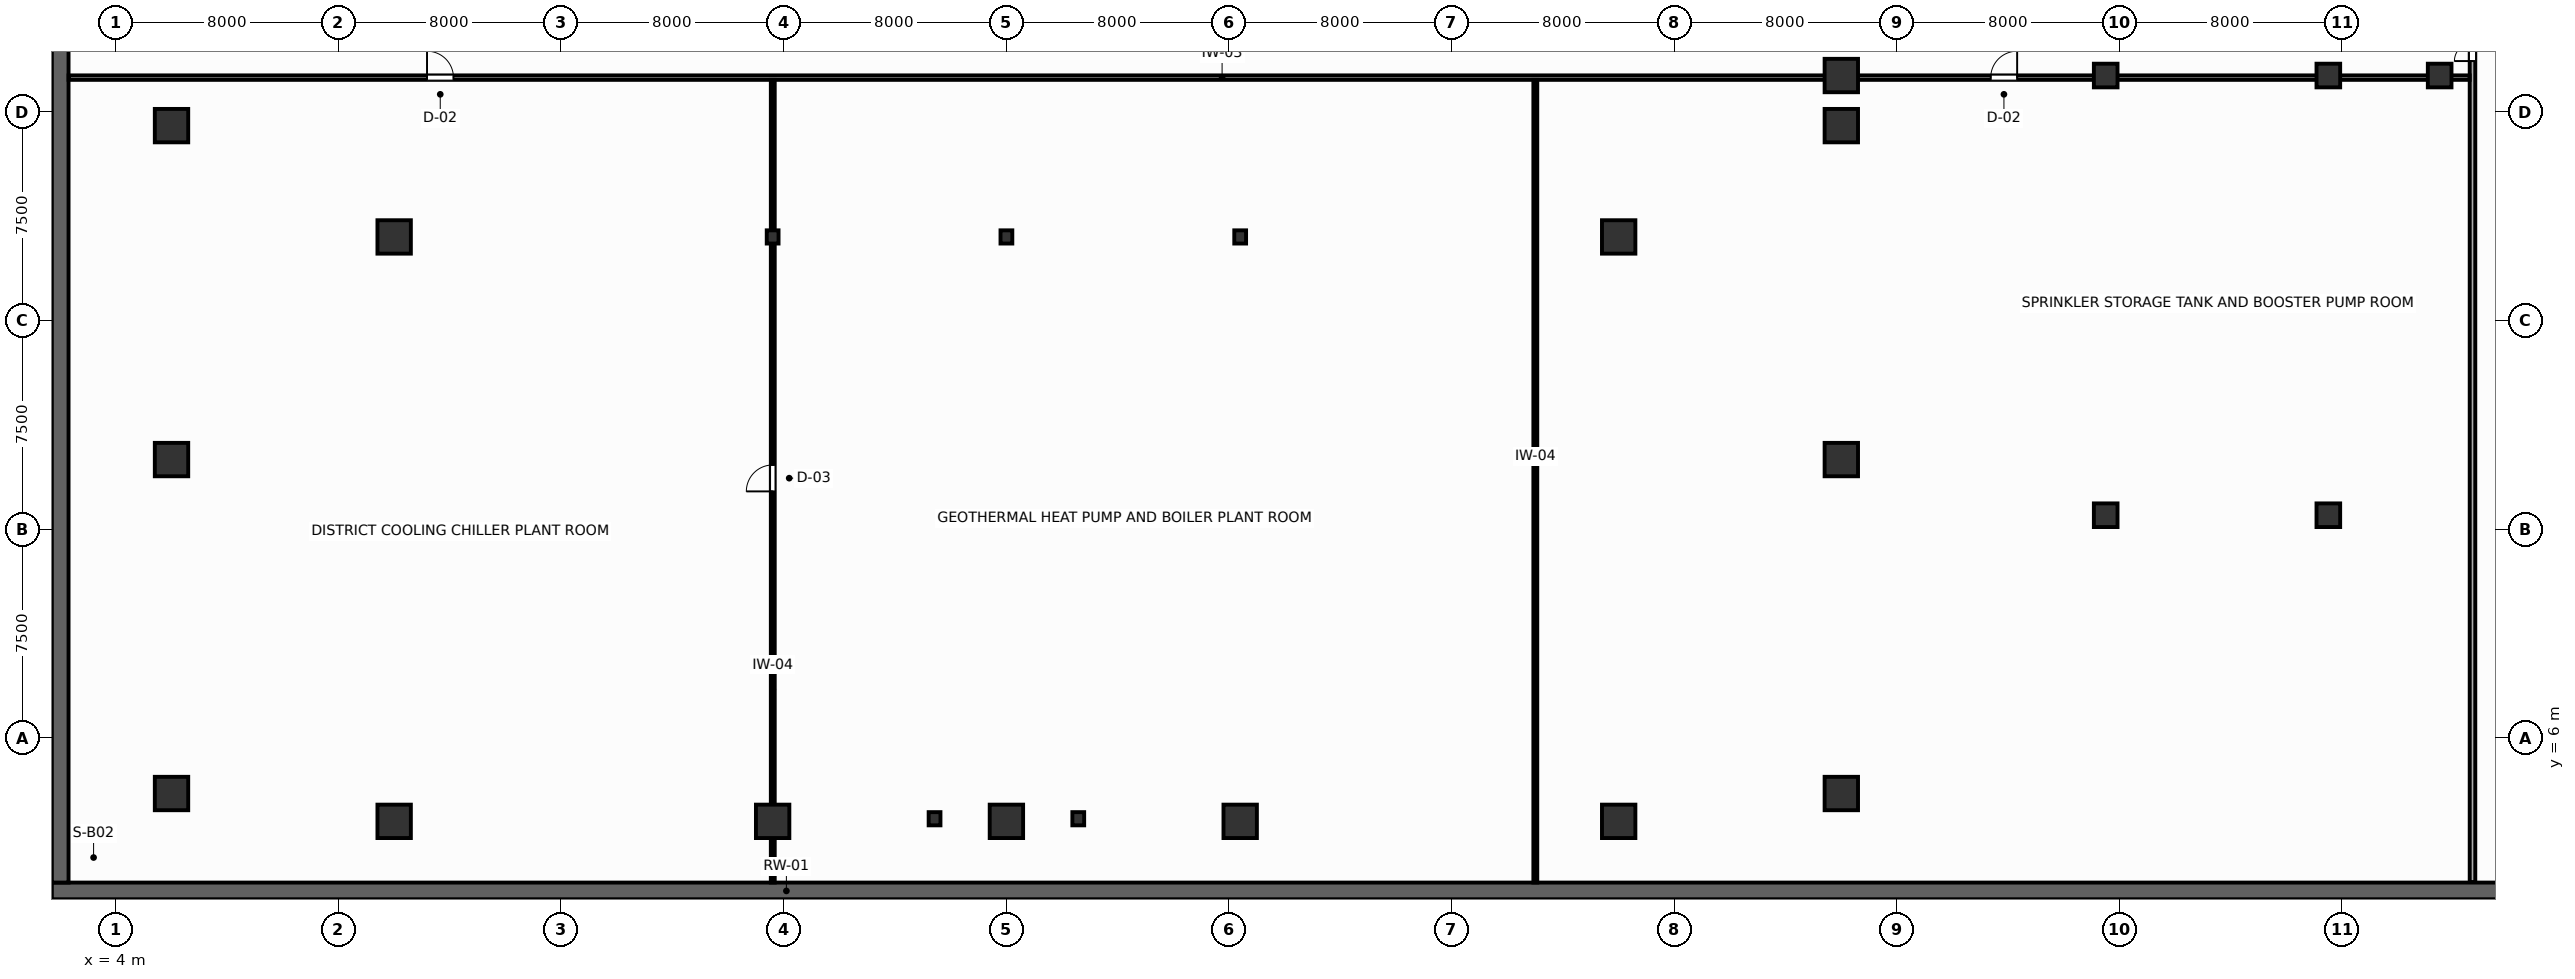
"""IFC4 building model, lengths in metres.
Left out: names, types, materials, properties, quantities, classifications, styles, units other than length and angle.
Written with IfcOpenShell. Run it as: python <this file> out.ifc"""

import sys

from ifc_helpers import new_model, si_unit, direction, frame, frame_2d, origin, origin_2d, place, context, subcontext, project, spatial, rectangle, i_section, extrude, source, transform, mapped, element, fill, save


model = new_model("IFC4")
c1 = context("Model", 3, precision=1e-05, world=origin(), true_north=direction((0.0, 1.0)))
c2 = subcontext(c1, "Body", "Model", "MODEL_VIEW")
j1 = project(units=[si_unit("LENGTHUNIT", "METRE"), si_unit("PLANEANGLEUNIT", "RADIAN")], contexts=[c1])
p1 = place(None, origin())
s1 = spatial("IfcSite", under=j1, at=p1, CompositionType="ELEMENT")
p2 = place(p1, origin())
s2 = spatial("IfcBuilding", under=s1, at=p2, CompositionType="ELEMENT")
p3 = place(p2, frame((0.0, 0.0, -9.0)))
s3 = spatial("IfcBuildingStorey", under=s2, at=p3, CompositionType="ELEMENT", Elevation=-9.0)
p4 = place(p3, frame((1.7, 0.5, 0.0), z_axis=(0.0, 0.0, 1.0), x_axis=(1.0, 0.0, 0.0)))
e1 = element("IfcWall", 1, at=p4, inside=s3, PredefinedType="SOLIDWALL", context=c2, shape_type="SweptSolid", body=[
    extrude(rectangle(XDim=87.98, YDim=0.6, at=frame_2d((43.99, 0.0))), origin(), (0.0, 0.0, 1.0), 4.5),
])
p5 = place(p3, frame((2.0, 0.8, 0.0), z_axis=(0.0, 0.0, 1.0), x_axis=(0.0, 1.0, 0.0)))
e2 = element("IfcWall", 2, at=p5, inside=s3, PredefinedType="SOLIDWALL", context=c2, shape_type="SweptSolid", body=[
    extrude(rectangle(XDim=64.9, YDim=0.6, at=frame_2d((32.45, 0.0))), origin(), (0.0, 0.0, 1.0), 4.5),
])
m1 = source(origin(), c2, "Body", "SweptSolid", [
    extrude(i_section(OverallWidth=0.424, OverallDepth=0.474, WebThickness=0.045, FlangeThickness=0.072, FilletRadius=0.015, at=origin_2d()), origin(), (0.0, 0.0, 1.0), 4.5),
])
for number, where, z_axis, x_axis in (
    (3, (27.6, 24.0, 0.0), (0.0, 0.0, 1.0), (1.0, 0.0, 0.0)),
    (4, (44.4, 24.0, 0.0), (0.0, 0.0, 1.0), (1.0, 0.0, 0.0)),
    (5, (36.0, 24.0, 0.0), (0.0, 0.0, 1.0), (1.0, 0.0, 0.0)),
):
    element("IfcColumn", number, at=place(p3, frame(where, z_axis=z_axis, x_axis=x_axis)), inside=s3, PredefinedType="COLUMN", context=c2, shape_type="MappedRepresentation", body=[
        mapped(m1, transform((0.0, 0.0, 0.0), scale=1.0)),
    ])
m2 = source(origin(), c2, "Body", "SweptSolid", [
    extrude(rectangle(XDim=1.2, YDim=1.2, at=origin_2d()), origin(), (0.0, 0.0, 1.0), 4.5),
])
for number, where, z_axis, x_axis in (
    (6, (6.0, 4.0, 0.0), (0.0, 0.0, 1.0), (1.0, 0.0, 0.0)),
    (7, (6.0, 16.0, 0.0), (0.0, 0.0, 1.0), (1.0, 0.0, 0.0)),
    (8, (6.0, 28.0, 0.0), (0.0, 0.0, 1.0), (1.0, 0.0, 0.0)),
    (9, (66.0, 4.0, 0.0), (0.0, 0.0, 1.0), (1.0, 0.0, 0.0)),
    (10, (66.0, 16.0, 0.0), (0.0, 0.0, 1.0), (1.0, 0.0, 0.0)),
    (11, (66.0, 28.0, 0.0), (0.0, 0.0, 1.0), (1.0, 0.0, 0.0)),
    (12, (14.0, 3.0, 0.0), (0.0, 0.0, 1.0), (1.0, 0.0, 0.0)),
    (13, (27.6, 3.0, 0.0), (0.0, 0.0, 1.0), (1.0, 0.0, 0.0)),
    (14, (36.0, 3.0, 0.0), (0.0, 0.0, 1.0), (1.0, 0.0, 0.0)),
    (15, (44.4, 3.0, 0.0), (0.0, 0.0, 1.0), (1.0, 0.0, 0.0)),
    (16, (58.0, 3.0, 0.0), (0.0, 0.0, 1.0), (1.0, 0.0, 0.0)),
    (17, (14.0, 24.0, 0.0), (0.0, 0.0, 1.0), (1.0, 0.0, 0.0)),
    (18, (58.0, 24.0, 0.0), (0.0, 0.0, 1.0), (1.0, 0.0, 0.0)),
    (19, (66.0, 29.8, 0.0), (0.0, 0.0, 1.0), (1.0, 0.0, 0.0)),
):
    element("IfcColumn", number, at=place(p3, frame(where, z_axis=z_axis, x_axis=x_axis)), inside=s3, PredefinedType="COLUMN", context=c2, shape_type="MappedRepresentation", body=[
        mapped(m2, transform((0.0, 0.0, 0.0), scale=1.0)),
    ])
for number, where, z_axis, x_axis in (
    (20, (33.418, 3.094, 0.0), (0.0, 0.0, 1.0), (1.0, 0.0, 0.0)),
    (21, (38.582, 3.094, 0.0), (0.0, 0.0, 1.0), (1.0, 0.0, 0.0)),
):
    element("IfcColumn", number, at=place(p3, frame(where, z_axis=z_axis, x_axis=x_axis)), inside=s3, PredefinedType="COLUMN", context=c2, shape_type="MappedRepresentation", body=[
        mapped(m1, transform((0.0, 0.0, 0.0), scale=1.0)),
    ])
m3 = source(origin(), c2, "Body", "SweptSolid", [
    extrude(rectangle(XDim=0.85, YDim=0.85, at=origin_2d()), origin(), (0.0, 0.0, 1.0), 4.5),
])
for number, where, z_axis, x_axis in (
    (22, (75.5, 29.8, 0.0), (0.0, 0.0, 1.0), (1.0, 0.0, 0.0)),
    (23, (83.5, 29.8, 0.0), (0.0, 0.0, 1.0), (1.0, 0.0, 0.0)),
    (24, (87.5, 29.8, 0.0), (0.0, 0.0, 1.0), (1.0, 0.0, 0.0)),
    (25, (75.5, 14.0, 0.0), (0.0, 0.0, 1.0), (1.0, 0.0, 0.0)),
    (26, (83.5, 14.0, 0.0), (0.0, 0.0, 1.0), (1.0, 0.0, 0.0)),
):
    element("IfcColumn", number, at=place(p3, frame(where, z_axis=z_axis, x_axis=x_axis)), inside=s3, PredefinedType="COLUMN", context=c2, shape_type="MappedRepresentation", body=[
        mapped(m3, transform((0.0, 0.0, 0.0), scale=1.0)),
    ])
p6 = place(p3, frame((88.68, 0.82, 0.0), z_axis=(0.0, 0.0, 1.0), x_axis=(0.0, 1.0, 0.0)))
e27 = element("IfcWall", 27, at=p6, inside=s3, PredefinedType="PARTITIONING", context=c2, shape_type="SweptSolid", body=[
    extrude(rectangle(XDim=64.86, YDim=0.2, at=frame_2d((32.43, 0.0))), origin(), (0.0, 0.0, 1.0), 4.18),
])
p7 = place(p6, frame((29.5, 0.0, 0.0)))
e28 = element("IfcOpeningElement", 28, at=p7, cuts=e27, PredefinedType="OPENING", context=c2, shape_type="SweptSolid", body=[
    extrude(rectangle(XDim=1.3, YDim=2.1, at=frame_2d((0.65, 1.05))), frame((0.0, 0.11, 0.0), z_axis=(0.0, -1.0, 0.0), x_axis=(1.0, 0.0, 0.0)), (0.0, 0.0, 1.0), 0.22),
])
p8 = place(p3, frame((2.302, 29.725, 0.0), z_axis=(0.0, 0.0, 1.0), x_axis=(1.0, 0.0, 0.0)))
e29 = element("IfcWall", 29, at=p8, inside=s3, PredefinedType="PARTITIONING", context=c2, shape_type="SweptSolid", body=[
    extrude(rectangle(XDim=86.276, YDim=0.16, at=frame_2d((43.138, 0.0))), origin(), (0.0, 0.0, 1.0), 3.69),
])
p9 = place(p8, frame((12.879, 0.0, 0.0)))
e30 = element("IfcOpeningElement", 30, at=p9, cuts=e29, PredefinedType="OPENING", context=c2, shape_type="SweptSolid", body=[
    extrude(rectangle(XDim=0.95, YDim=2.05, at=frame_2d((0.475, 1.025))), frame((0.0, 0.09, 0.0), z_axis=(0.0, -1.0, 0.0), x_axis=(1.0, 0.0, 0.0)), (0.0, 0.0, 1.0), 0.18),
])
p10 = place(p8, frame((69.066, 0.0, 0.0)))
e31 = element("IfcOpeningElement", 31, at=p10, cuts=e29, PredefinedType="OPENING", context=c2, shape_type="SweptSolid", body=[
    extrude(rectangle(XDim=0.95, YDim=2.05, at=frame_2d((0.475, 1.025))), frame((0.0, 0.09, 0.0), z_axis=(0.0, -1.0, 0.0), x_axis=(1.0, 0.0, 0.0)), (0.0, 0.0, 1.0), 0.18),
])
p11 = place(p3, frame((27.605, 0.802, 0.0), z_axis=(0.0, 0.0, 1.0), x_axis=(0.0, 1.0, 0.0)))
e32 = element("IfcWall", 32, at=p11, inside=s3, PredefinedType="PARTITIONING", context=c2, shape_type="SweptSolid", body=[
    extrude(rectangle(XDim=28.841, YDim=0.14, at=frame_2d((14.42, 0.0))), origin(), (0.0, 0.0, 1.0), 3.53),
])
p12 = place(p11, frame((14.054, 0.0, 0.0)))
e33 = element("IfcOpeningElement", 33, at=p12, cuts=e32, PredefinedType="OPENING", context=c2, shape_type="SweptSolid", body=[
    extrude(rectangle(XDim=0.95, YDim=2.05, at=frame_2d((0.475, 1.025))), frame((0.0, 0.08, 0.0), z_axis=(0.0, -1.0, 0.0), x_axis=(1.0, 0.0, 0.0)), (0.0, 0.0, 1.0), 0.16),
])
p13 = place(p3, frame((55.005, 0.802, 0.0), z_axis=(0.0, 0.0, 1.0), x_axis=(0.0, 1.0, 0.0)))
e34 = element("IfcWall", 34, at=p13, inside=s3, PredefinedType="PARTITIONING", context=c2, shape_type="SweptSolid", body=[
    extrude(rectangle(XDim=28.841, YDim=0.14, at=frame_2d((14.42, 0.0))), origin(), (0.0, 0.0, 1.0), 4.18),
])
p14 = place(p7, origin())
e35 = element("IfcDoor", 35, at=p14, inside=s3, OperationType="DOUBLE_DOOR_SINGLE_SWING", PredefinedType="DOOR", context=c2, shape_type="SweptSolid", body=[
    extrude(rectangle(XDim=1.3, YDim=2.1, at=frame_2d((0.65, 1.05))), frame((0.0, 0.025, 0.0), z_axis=(0.0, -1.0, 0.0), x_axis=(1.0, 0.0, 0.0)), (0.0, 0.0, 1.0), 0.05),
])
fill(e28, e35)
p15 = place(p9, origin())
e36 = element("IfcDoor", 36, at=p15, inside=s3, OperationType="SINGLE_SWING_LEFT", PredefinedType="DOOR", context=c2, shape_type="SweptSolid", body=[
    extrude(rectangle(XDim=0.95, YDim=2.05, at=frame_2d((0.475, 1.025))), frame((0.0, 0.025, 0.0), z_axis=(0.0, -1.0, 0.0), x_axis=(1.0, 0.0, 0.0)), (0.0, 0.0, 1.0), 0.05),
])
fill(e30, e36)
p16 = place(p10, origin())
e37 = element("IfcDoor", 37, at=p16, inside=s3, OperationType="SINGLE_SWING_RIGHT", PredefinedType="DOOR", context=c2, shape_type="SweptSolid", body=[
    extrude(rectangle(XDim=0.95, YDim=2.05, at=frame_2d((0.475, 1.025))), frame((0.0, 0.025, 0.0), z_axis=(0.0, -1.0, 0.0), x_axis=(1.0, 0.0, 0.0)), (0.0, 0.0, 1.0), 0.05),
])
fill(e31, e37)
p17 = place(p12, origin())
e38 = element("IfcDoor", 38, at=p17, inside=s3, OperationType="SINGLE_SWING_LEFT", PredefinedType="DOOR", context=c2, shape_type="SweptSolid", body=[
    extrude(rectangle(XDim=0.95, YDim=2.05, at=frame_2d((0.475, 1.025))), frame((0.0, 0.025, 0.0), z_axis=(0.0, -1.0, 0.0), x_axis=(1.0, 0.0, 0.0)), (0.0, 0.0, 1.0), 0.05),
])
fill(e33, e38)
save(model, sys.argv[1])
